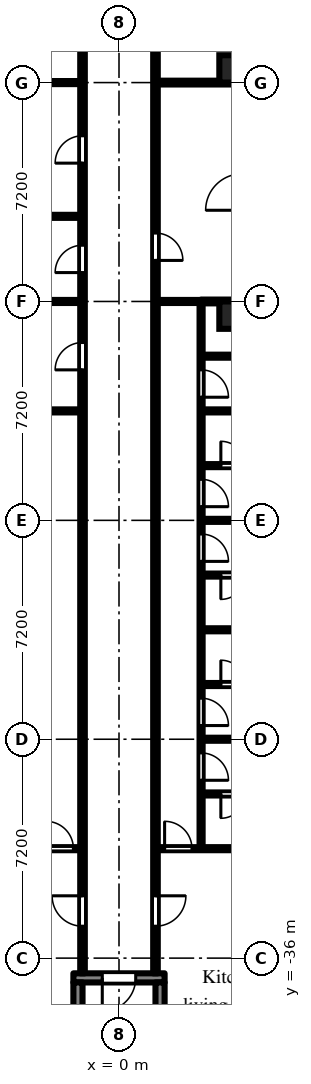
"""IFC4 building model, lengths in metres.
Left out: names, types, materials, properties, quantities, classifications, styles, units other than length and angle.
Written with IfcOpenShell. Run it as: python <this file> out.ifc"""

import sys

from ifc_helpers import new_model, si_unit, direction, frame, frame_2d, origin, origin_2d, place, context, subcontext, project, spatial, rectangle, extrude, element, fill, save


model = new_model("IFC4")
c1 = context("Model", 3, precision=1e-05, world=origin(), true_north=direction((0.0, 1.0)))
c2 = subcontext(c1, "Body", "Model", "MODEL_VIEW")
j1 = project(units=[si_unit("LENGTHUNIT", "METRE"), si_unit("PLANEANGLEUNIT", "RADIAN")], contexts=[c1])
p1 = place(None, origin())
s1 = spatial("IfcSite", under=j1, at=p1, CompositionType="ELEMENT")
p2 = place(p1, origin())
s2 = spatial("IfcBuilding", under=s1, at=p2, CompositionType="ELEMENT")
p3 = place(p2, frame((0.0, 0.0, 20.7)))
s3 = spatial("IfcBuildingStorey", under=s2, at=p3, CompositionType="ELEMENT", Elevation=20.7)
for number, where, z_axis, x_axis in (
    (1, (3.75, -14.85, 0.0), (0.0, 0.0, 1.0), (1.0, 0.0, 0.0)),
    (2, (3.75, -6.75, 0.0), (0.0, 0.0, 1.0), (1.0, 0.0, 0.0)),
):
    element("IfcColumn", number, at=place(p3, frame(where, z_axis=z_axis, x_axis=x_axis)), inside=s3, PredefinedType="COLUMN", context=c2, shape_type="SweptSolid", body=[
        extrude(rectangle(XDim=0.9, YDim=0.9, at=origin_2d()), origin(), (0.0, 0.0, 1.0), 3.0),
    ])
p4 = place(p3, frame((-1.5, -36.65, 0.0), z_axis=(0.0, 0.0, 1.0), x_axis=(1.0, 0.0, 0.0)))
e3 = element("IfcWall", 3, at=p4, inside=s3, PredefinedType="SHEAR", context=c2, shape_type="SweptSolid", body=[
    extrude(rectangle(XDim=3.0, YDim=0.3, at=frame_2d((1.5, 0.0))), origin(), (0.0, 0.0, 1.0), 2.575),
])
p5 = place(p4, frame((0.95, 0.0, 0.0)))
e4 = element("IfcOpeningElement", 4, at=p5, cuts=e3, PredefinedType="OPENING", context=c2, shape_type="SweptSolid", body=[
    extrude(rectangle(XDim=1.1, YDim=2.1, at=frame_2d((0.55, 1.05))), frame((0.0, 0.16, 0.0), z_axis=(0.0, -1.0, 0.0), x_axis=(1.0, 0.0, 0.0)), (0.0, 0.0, 1.0), 0.32),
])
for number, where, z_axis, x_axis in (
    (5, (-1.35, -36.8, 0.0), (0.0, 0.0, 1.0), (0.0, -1.0, 0.0)),
    (6, (1.35, -36.8, 0.0), (0.0, 0.0, 1.0), (0.0, -1.0, 0.0)),
):
    element("IfcWall", number, at=place(p3, frame(where, z_axis=z_axis, x_axis=x_axis)), inside=s3, PredefinedType="SHEAR", context=c2, shape_type="SweptSolid", body=[
        extrude(rectangle(XDim=5.8, YDim=0.3, at=frame_2d((2.9, 0.0))), origin(), (0.0, 0.0, 1.0), 2.575),
    ])
p6 = place(p3, frame((-6.9, -32.4, 0.0), z_axis=(0.0, 0.0, 1.0), x_axis=(1.0, 0.0, 0.0)))
e7 = element("IfcWall", 7, at=p6, inside=s3, PredefinedType="PARTITIONING", context=c2, shape_type="SweptSolid", body=[
    extrude(rectangle(XDim=5.625, YDim=0.1, at=frame_2d((2.812, 0.0))), origin(), (0.0, 0.0, 1.0), 2.575),
])
p7 = place(p6, frame((4.5, 0.0, 0.0)))
e8 = element("IfcOpeningElement", 8, at=p7, cuts=e7, PredefinedType="OPENING", context=c2, shape_type="SweptSolid", body=[
    extrude(rectangle(XDim=0.9, YDim=2.1, at=frame_2d((0.45, 1.05))), frame((0.0, 0.06, 0.0), z_axis=(0.0, -1.0, 0.0), x_axis=(1.0, 0.0, 0.0)), (0.0, 0.0, 1.0), 0.12),
])
p8 = place(p3, frame((-6.9, -18.0, 0.0), z_axis=(0.0, 0.0, 1.0), x_axis=(1.0, 0.0, 0.0)))
e9 = element("IfcWall", 9, at=p8, inside=s3, PredefinedType="PARTITIONING", context=c2, shape_type="SweptSolid", body=[
    extrude(rectangle(XDim=5.625, YDim=0.1, at=frame_2d((2.812, 0.0))), origin(), (0.0, 0.0, 1.0), 2.575),
])
for number, where, z_axis, x_axis in (
    (10, (-3.9, -14.4, 0.0), (0.0, 0.0, 1.0), (1.0, 0.0, 0.0)),
    (11, (-3.9, -11.6, 0.0), (0.0, 0.0, 1.0), (1.0, 0.0, 0.0)),
    (12, (-3.9, -7.2, 0.0), (0.0, 0.0, 1.0), (1.0, 0.0, 0.0)),
):
    element("IfcWall", number, at=place(p3, frame(where, z_axis=z_axis, x_axis=x_axis)), inside=s3, PredefinedType="PARTITIONING", context=c2, shape_type="SweptSolid", body=[
        extrude(rectangle(XDim=2.625, YDim=0.1, at=frame_2d((1.312, 0.0))), origin(), (0.0, 0.0, 1.0), 2.575),
    ])
p9 = place(p3, frame((-1.2, -36.5, 0.0), z_axis=(0.0, 0.0, 1.0), x_axis=(0.0, 1.0, 0.0)))
e13 = element("IfcWall", 13, at=p9, inside=s3, PredefinedType="PARTITIONING", context=c2, shape_type="SweptSolid", body=[
    extrude(rectangle(XDim=35.225, YDim=0.15, at=frame_2d((17.613, 0.0))), origin(), (0.0, 0.0, 1.0), 2.575),
])
p10 = place(p9, frame((30.35, 0.0, 0.0)))
e14 = element("IfcOpeningElement", 14, at=p10, cuts=e13, PredefinedType="OPENING", context=c2, shape_type="SweptSolid", body=[
    extrude(rectangle(XDim=0.9, YDim=2.1, at=frame_2d((0.45, 1.05))), frame((0.0, 0.085, 0.0), z_axis=(0.0, -1.0, 0.0), x_axis=(1.0, 0.0, 0.0)), (0.0, 0.0, 1.0), 0.17),
])
p11 = place(p9, frame((23.05, 0.0, 0.0)))
e15 = element("IfcOpeningElement", 15, at=p11, cuts=e13, PredefinedType="OPENING", context=c2, shape_type="SweptSolid", body=[
    extrude(rectangle(XDim=0.9, YDim=2.1, at=frame_2d((0.45, 1.05))), frame((0.0, 0.085, 0.0), z_axis=(0.0, -1.0, 0.0), x_axis=(1.0, 0.0, 0.0)), (0.0, 0.0, 1.0), 0.17),
])
p12 = place(p9, frame((26.65, 0.0, 0.0)))
e16 = element("IfcOpeningElement", 16, at=p12, cuts=e13, PredefinedType="OPENING", context=c2, shape_type="SweptSolid", body=[
    extrude(rectangle(XDim=0.9, YDim=2.1, at=frame_2d((0.45, 1.05))), frame((0.0, 0.085, 0.0), z_axis=(0.0, -1.0, 0.0), x_axis=(1.0, 0.0, 0.0)), (0.0, 0.0, 1.0), 0.17),
])
p13 = place(p9, frame((19.85, 0.0, 0.0)))
e17 = element("IfcOpeningElement", 17, at=p13, cuts=e13, PredefinedType="OPENING", context=c2, shape_type="SweptSolid", body=[
    extrude(rectangle(XDim=0.9, YDim=2.1, at=frame_2d((0.45, 1.05))), frame((0.0, 0.085, 0.0), z_axis=(0.0, -1.0, 0.0), x_axis=(1.0, 0.0, 0.0)), (0.0, 0.0, 1.0), 0.17),
])
p14 = place(p9, frame((1.55, 0.0, 0.0)))
e18 = element("IfcOpeningElement", 18, at=p14, cuts=e13, PredefinedType="OPENING", context=c2, shape_type="SweptSolid", body=[
    extrude(rectangle(XDim=1.0, YDim=2.1, at=frame_2d((0.5, 1.05))), frame((0.0, 0.085, 0.0), z_axis=(0.0, -1.0, 0.0), x_axis=(1.0, 0.0, 0.0)), (0.0, 0.0, 1.0), 0.17),
])
p15 = place(p3, frame((1.2, -36.5, 0.0), z_axis=(0.0, 0.0, 1.0), x_axis=(0.0, 1.0, 0.0)))
e19 = element("IfcWall", 19, at=p15, inside=s3, PredefinedType="PARTITIONING", context=c2, shape_type="SweptSolid", body=[
    extrude(rectangle(XDim=35.375, YDim=0.15, at=frame_2d((17.688, 0.0))), origin(), (0.0, 0.0, 1.0), 2.575),
])
p16 = place(p15, frame((31.85, 0.0, 0.0)))
e20 = element("IfcOpeningElement", 20, at=p16, cuts=e19, PredefinedType="OPENING", context=c2, shape_type="SweptSolid", body=[
    extrude(rectangle(XDim=0.9, YDim=2.1, at=frame_2d((0.45, 1.05))), frame((0.0, 0.085, 0.0), z_axis=(0.0, -1.0, 0.0), x_axis=(1.0, 0.0, 0.0)), (0.0, 0.0, 1.0), 0.17),
])
p17 = place(p15, frame((23.45, 0.0, 0.0)))
e21 = element("IfcOpeningElement", 21, at=p17, cuts=e19, PredefinedType="OPENING", context=c2, shape_type="SweptSolid", body=[
    extrude(rectangle(XDim=0.9, YDim=2.1, at=frame_2d((0.45, 1.05))), frame((0.0, 0.085, 0.0), z_axis=(0.0, -1.0, 0.0), x_axis=(1.0, 0.0, 0.0)), (0.0, 0.0, 1.0), 0.17),
])
p18 = place(p15, frame((1.55, 0.0, 0.0)))
e22 = element("IfcOpeningElement", 22, at=p18, cuts=e19, PredefinedType="OPENING", context=c2, shape_type="SweptSolid", body=[
    extrude(rectangle(XDim=1.0, YDim=2.1, at=frame_2d((0.5, 1.05))), frame((0.0, 0.085, 0.0), z_axis=(0.0, -1.0, 0.0), x_axis=(1.0, 0.0, 0.0)), (0.0, 0.0, 1.0), 0.17),
])
p19 = place(p3, frame((1.275, -32.4, 0.0), z_axis=(0.0, 0.0, 1.0), x_axis=(1.0, 0.0, 0.0)))
e23 = element("IfcWall", 23, at=p19, inside=s3, PredefinedType="PARTITIONING", context=c2, shape_type="SweptSolid", body=[
    extrude(rectangle(XDim=5.625, YDim=0.1, at=frame_2d((2.812, 0.0))), origin(), (0.0, 0.0, 1.0), 2.575),
])
p20 = place(p19, frame((0.225, 0.0, 0.0)))
e24 = element("IfcOpeningElement", 24, at=p20, cuts=e23, PredefinedType="OPENING", context=c2, shape_type="SweptSolid", body=[
    extrude(rectangle(XDim=0.9, YDim=2.1, at=frame_2d((0.45, 1.05))), frame((0.0, 0.06, 0.0), z_axis=(0.0, -1.0, 0.0), x_axis=(1.0, 0.0, 0.0)), (0.0, 0.0, 1.0), 0.12),
])
p21 = place(p3, frame((1.275, -14.4, 0.0), z_axis=(0.0, 0.0, 1.0), x_axis=(1.0, 0.0, 0.0)))
e25 = element("IfcWall", 25, at=p21, inside=s3, PredefinedType="PARTITIONING", context=c2, shape_type="SweptSolid", body=[
    extrude(rectangle(XDim=1.425, YDim=0.1, at=frame_2d((0.712, 0.0))), origin(), (0.0, 0.0, 1.0), 2.575),
])
p22 = place(p3, frame((1.275, -7.2, 0.0), z_axis=(0.0, 0.0, 1.0), x_axis=(1.0, 0.0, 0.0)))
e26 = element("IfcWall", 26, at=p22, inside=s3, PredefinedType="PARTITIONING", context=c2, shape_type="SweptSolid", body=[
    extrude(rectangle(XDim=2.625, YDim=0.125, at=frame_2d((1.312, 0.0))), origin(), (0.0, 0.0, 1.0), 2.575),
])
p23 = place(p3, frame((2.7, -32.35, 0.0), z_axis=(0.0, 0.0, 1.0), x_axis=(0.0, 1.0, 0.0)))
e27 = element("IfcWall", 27, at=p23, inside=s3, PredefinedType="PARTITIONING", context=c2, shape_type="SweptSolid", body=[
    extrude(rectangle(XDim=17.888, YDim=0.1, at=frame_2d((8.944, 0.0))), origin(), (0.0, 0.0, 1.0), 2.575),
])
p24 = place(p23, frame((2.2, 0.0, 0.0)))
e28 = element("IfcOpeningElement", 28, at=p24, cuts=e27, PredefinedType="OPENING", context=c2, shape_type="SweptSolid", body=[
    extrude(rectangle(XDim=0.9, YDim=2.1, at=frame_2d((0.45, 1.05))), frame((0.0, 0.06, 0.0), z_axis=(0.0, -1.0, 0.0), x_axis=(1.0, 0.0, 0.0)), (0.0, 0.0, 1.0), 0.12),
])
p25 = place(p23, frame((4.0, 0.0, 0.0)))
e29 = element("IfcOpeningElement", 29, at=p25, cuts=e27, PredefinedType="OPENING", context=c2, shape_type="SweptSolid", body=[
    extrude(rectangle(XDim=0.9, YDim=2.1, at=frame_2d((0.45, 1.05))), frame((0.0, 0.06, 0.0), z_axis=(0.0, -1.0, 0.0), x_axis=(1.0, 0.0, 0.0)), (0.0, 0.0, 1.0), 0.12),
])
p26 = place(p23, frame((9.4, 0.0, 0.0)))
e30 = element("IfcOpeningElement", 30, at=p26, cuts=e27, PredefinedType="OPENING", context=c2, shape_type="SweptSolid", body=[
    extrude(rectangle(XDim=0.9, YDim=2.1, at=frame_2d((0.45, 1.05))), frame((0.0, 0.06, 0.0), z_axis=(0.0, -1.0, 0.0), x_axis=(1.0, 0.0, 0.0)), (0.0, 0.0, 1.0), 0.12),
])
p27 = place(p23, frame((11.2, 0.0, 0.0)))
e31 = element("IfcOpeningElement", 31, at=p27, cuts=e27, PredefinedType="OPENING", context=c2, shape_type="SweptSolid", body=[
    extrude(rectangle(XDim=0.9, YDim=2.1, at=frame_2d((0.45, 1.05))), frame((0.0, 0.06, 0.0), z_axis=(0.0, -1.0, 0.0), x_axis=(1.0, 0.0, 0.0)), (0.0, 0.0, 1.0), 0.12),
])
p28 = place(p23, frame((14.8, 0.0, 0.0)))
e32 = element("IfcOpeningElement", 32, at=p28, cuts=e27, PredefinedType="OPENING", context=c2, shape_type="SweptSolid", body=[
    extrude(rectangle(XDim=0.9, YDim=2.1, at=frame_2d((0.45, 1.05))), frame((0.0, 0.06, 0.0), z_axis=(0.0, -1.0, 0.0), x_axis=(1.0, 0.0, 0.0)), (0.0, 0.0, 1.0), 0.12),
])
p29 = place(p3, frame((2.75, -30.6, 0.0), z_axis=(0.0, 0.0, 1.0), x_axis=(1.0, 0.0, 0.0)))
e33 = element("IfcWall", 33, at=p29, inside=s3, PredefinedType="PARTITIONING", context=c2, shape_type="SweptSolid", body=[
    extrude(rectangle(XDim=2.1, YDim=0.1, at=frame_2d((1.05, 0.0))), origin(), (0.0, 0.0, 1.0), 2.575),
])
p30 = place(p29, frame((0.6, 0.0, 0.0)))
e34 = element("IfcOpeningElement", 34, at=p30, cuts=e33, PredefinedType="OPENING", context=c2, shape_type="SweptSolid", body=[
    extrude(rectangle(XDim=0.8, YDim=2.1, at=frame_2d((0.4, 1.05))), frame((0.0, 0.06, 0.0), z_axis=(0.0, -1.0, 0.0), x_axis=(1.0, 0.0, 0.0)), (0.0, 0.0, 1.0), 0.12),
])
p31 = place(p3, frame((2.75, -28.8, 0.0), z_axis=(0.0, 0.0, 1.0), x_axis=(1.0, 0.0, 0.0)))
e35 = element("IfcWall", 35, at=p31, inside=s3, PredefinedType="PARTITIONING", context=c2, shape_type="SweptSolid", body=[
    extrude(rectangle(XDim=4.15, YDim=0.1, at=frame_2d((2.075, 0.0))), origin(), (0.0, 0.0, 1.0), 2.575),
])
p32 = place(p3, frame((2.75, -27.0, 0.0), z_axis=(0.0, 0.0, 1.0), x_axis=(1.0, 0.0, 0.0)))
e36 = element("IfcWall", 36, at=p32, inside=s3, PredefinedType="PARTITIONING", context=c2, shape_type="SweptSolid", body=[
    extrude(rectangle(XDim=2.1, YDim=0.1, at=frame_2d((1.05, 0.0))), origin(), (0.0, 0.0, 1.0), 2.575),
])
p33 = place(p32, frame((0.6, 0.0, 0.0)))
e37 = element("IfcOpeningElement", 37, at=p33, cuts=e36, PredefinedType="OPENING", context=c2, shape_type="SweptSolid", body=[
    extrude(rectangle(XDim=0.8, YDim=2.1, at=frame_2d((0.4, 1.05))), frame((0.0, 0.06, 0.0), z_axis=(0.0, -1.0, 0.0), x_axis=(1.0, 0.0, 0.0)), (0.0, 0.0, 1.0), 0.12),
])
p34 = place(p3, frame((2.75, -25.2, 0.0), z_axis=(0.0, 0.0, 1.0), x_axis=(1.0, 0.0, 0.0)))
e38 = element("IfcWall", 38, at=p34, inside=s3, PredefinedType="PARTITIONING", context=c2, shape_type="SweptSolid", body=[
    extrude(rectangle(XDim=4.15, YDim=0.1, at=frame_2d((2.075, 0.0))), origin(), (0.0, 0.0, 1.0), 2.575),
])
p35 = place(p3, frame((2.75, -23.4, 0.0), z_axis=(0.0, 0.0, 1.0), x_axis=(1.0, 0.0, 0.0)))
e39 = element("IfcWall", 39, at=p35, inside=s3, PredefinedType="PARTITIONING", context=c2, shape_type="SweptSolid", body=[
    extrude(rectangle(XDim=2.1, YDim=0.1, at=frame_2d((1.05, 0.0))), origin(), (0.0, 0.0, 1.0), 2.575),
])
p36 = place(p35, frame((0.6, 0.0, 0.0)))
e40 = element("IfcOpeningElement", 40, at=p36, cuts=e39, PredefinedType="OPENING", context=c2, shape_type="SweptSolid", body=[
    extrude(rectangle(XDim=0.8, YDim=2.1, at=frame_2d((0.4, 1.05))), frame((0.0, 0.06, 0.0), z_axis=(0.0, -1.0, 0.0), x_axis=(1.0, 0.0, 0.0)), (0.0, 0.0, 1.0), 0.12),
])
p37 = place(p3, frame((2.75, -21.6, 0.0), z_axis=(0.0, 0.0, 1.0), x_axis=(1.0, 0.0, 0.0)))
e41 = element("IfcWall", 41, at=p37, inside=s3, PredefinedType="PARTITIONING", context=c2, shape_type="SweptSolid", body=[
    extrude(rectangle(XDim=4.15, YDim=0.1, at=frame_2d((2.075, 0.0))), origin(), (0.0, 0.0, 1.0), 2.575),
])
p38 = place(p3, frame((2.75, -19.8, 0.0), z_axis=(0.0, 0.0, 1.0), x_axis=(1.0, 0.0, 0.0)))
e42 = element("IfcWall", 42, at=p38, inside=s3, PredefinedType="PARTITIONING", context=c2, shape_type="SweptSolid", body=[
    extrude(rectangle(XDim=2.1, YDim=0.1, at=frame_2d((1.05, 0.0))), origin(), (0.0, 0.0, 1.0), 2.575),
])
p39 = place(p38, frame((0.6, 0.0, 0.0)))
e43 = element("IfcOpeningElement", 43, at=p39, cuts=e42, PredefinedType="OPENING", context=c2, shape_type="SweptSolid", body=[
    extrude(rectangle(XDim=0.8, YDim=2.1, at=frame_2d((0.4, 1.05))), frame((0.0, 0.06, 0.0), z_axis=(0.0, -1.0, 0.0), x_axis=(1.0, 0.0, 0.0)), (0.0, 0.0, 1.0), 0.12),
])
p40 = place(p3, frame((2.75, -18.0, 0.0), z_axis=(0.0, 0.0, 1.0), x_axis=(1.0, 0.0, 0.0)))
e44 = element("IfcWall", 44, at=p40, inside=s3, PredefinedType="PARTITIONING", context=c2, shape_type="SweptSolid", body=[
    extrude(rectangle(XDim=4.15, YDim=0.1, at=frame_2d((2.075, 0.0))), origin(), (0.0, 0.0, 1.0), 2.575),
])
p41 = place(p3, frame((2.75, -16.2, 0.0), z_axis=(0.0, 0.0, 1.0), x_axis=(1.0, 0.0, 0.0)))
e45 = element("IfcWall", 45, at=p41, inside=s3, PredefinedType="PARTITIONING", context=c2, shape_type="SweptSolid", body=[
    extrude(rectangle(XDim=2.1, YDim=0.1, at=frame_2d((1.05, 0.0))), origin(), (0.0, 0.0, 1.0), 2.575),
])
p42 = place(p3, frame((2.7, -14.4, 0.0), z_axis=(0.0, 0.0, 1.0), x_axis=(1.0, 0.0, 0.0)))
e46 = element("IfcWall", 46, at=p42, inside=s3, PredefinedType="PARTITIONING", context=c2, shape_type="SweptSolid", body=[
    extrude(rectangle(XDim=1.2, YDim=0.125, at=frame_2d((0.6, 0.0))), origin(), (0.0, 0.0, 1.0), 2.575),
])
p43 = place(p5, frame((1.1, 0.0, 0.0), z_axis=(0.0, 0.0, 1.0), x_axis=(-1.0, 0.0, 0.0)))
e47 = element("IfcDoor", 47, at=p43, inside=s3, OperationType="SINGLE_SWING_RIGHT", PredefinedType="DOOR", context=c2, shape_type="SweptSolid", body=[
    extrude(rectangle(XDim=1.1, YDim=2.1, at=frame_2d((0.55, 1.05))), frame((0.0, 0.025, 0.0), z_axis=(0.0, -1.0, 0.0), x_axis=(1.0, 0.0, 0.0)), (0.0, 0.0, 1.0), 0.05),
])
fill(e4, e47)
p44 = place(p17, frame((0.9, 0.0, 0.0), z_axis=(0.0, 0.0, 1.0), x_axis=(-1.0, 0.0, 0.0)))
e48 = element("IfcDoor", 48, at=p44, inside=s3, OperationType="SINGLE_SWING_RIGHT", PredefinedType="DOOR", context=c2, shape_type="SweptSolid", body=[
    extrude(rectangle(XDim=0.9, YDim=2.1, at=frame_2d((0.45, 1.05))), frame((0.0, 0.025, 0.0), z_axis=(0.0, -1.0, 0.0), x_axis=(1.0, 0.0, 0.0)), (0.0, 0.0, 1.0), 0.05),
])
fill(e21, e48)
p45 = place(p18, frame((1.0, 0.0, 0.0), z_axis=(0.0, 0.0, 1.0), x_axis=(-1.0, 0.0, 0.0)))
e49 = element("IfcDoor", 49, at=p45, inside=s3, OperationType="SINGLE_SWING_LEFT", PredefinedType="DOOR", context=c2, shape_type="SweptSolid", body=[
    extrude(rectangle(XDim=1.0, YDim=2.1, at=frame_2d((0.5, 1.05))), frame((0.0, 0.025, 0.0), z_axis=(0.0, -1.0, 0.0), x_axis=(1.0, 0.0, 0.0)), (0.0, 0.0, 1.0), 0.05),
])
fill(e22, e49)
p46 = place(p20, origin())
e50 = element("IfcDoor", 50, at=p46, inside=s3, OperationType="SINGLE_SWING_LEFT", PredefinedType="DOOR", context=c2, shape_type="SweptSolid", body=[
    extrude(rectangle(XDim=0.9, YDim=2.1, at=frame_2d((0.45, 1.05))), frame((0.0, 0.025, 0.0), z_axis=(0.0, -1.0, 0.0), x_axis=(1.0, 0.0, 0.0)), (0.0, 0.0, 1.0), 0.05),
])
fill(e24, e50)
p47 = place(p24, frame((0.9, 0.0, 0.0), z_axis=(0.0, 0.0, 1.0), x_axis=(-1.0, 0.0, 0.0)))
e51 = element("IfcDoor", 51, at=p47, inside=s3, OperationType="SINGLE_SWING_RIGHT", PredefinedType="DOOR", context=c2, shape_type="SweptSolid", body=[
    extrude(rectangle(XDim=0.9, YDim=2.1, at=frame_2d((0.45, 1.05))), frame((0.0, 0.025, 0.0), z_axis=(0.0, -1.0, 0.0), x_axis=(1.0, 0.0, 0.0)), (0.0, 0.0, 1.0), 0.05),
])
fill(e28, e51)
p48 = place(p25, frame((0.9, 0.0, 0.0), z_axis=(0.0, 0.0, 1.0), x_axis=(-1.0, 0.0, 0.0)))
e52 = element("IfcDoor", 52, at=p48, inside=s3, OperationType="SINGLE_SWING_RIGHT", PredefinedType="DOOR", context=c2, shape_type="SweptSolid", body=[
    extrude(rectangle(XDim=0.9, YDim=2.1, at=frame_2d((0.45, 1.05))), frame((0.0, 0.025, 0.0), z_axis=(0.0, -1.0, 0.0), x_axis=(1.0, 0.0, 0.0)), (0.0, 0.0, 1.0), 0.05),
])
fill(e29, e52)
p49 = place(p26, frame((0.9, 0.0, 0.0), z_axis=(0.0, 0.0, 1.0), x_axis=(-1.0, 0.0, 0.0)))
e53 = element("IfcDoor", 53, at=p49, inside=s3, OperationType="SINGLE_SWING_RIGHT", PredefinedType="DOOR", context=c2, shape_type="SweptSolid", body=[
    extrude(rectangle(XDim=0.9, YDim=2.1, at=frame_2d((0.45, 1.05))), frame((0.0, 0.025, 0.0), z_axis=(0.0, -1.0, 0.0), x_axis=(1.0, 0.0, 0.0)), (0.0, 0.0, 1.0), 0.05),
])
fill(e30, e53)
p50 = place(p27, frame((0.9, 0.0, 0.0), z_axis=(0.0, 0.0, 1.0), x_axis=(-1.0, 0.0, 0.0)))
e54 = element("IfcDoor", 54, at=p50, inside=s3, OperationType="SINGLE_SWING_RIGHT", PredefinedType="DOOR", context=c2, shape_type="SweptSolid", body=[
    extrude(rectangle(XDim=0.9, YDim=2.1, at=frame_2d((0.45, 1.05))), frame((0.0, 0.025, 0.0), z_axis=(0.0, -1.0, 0.0), x_axis=(1.0, 0.0, 0.0)), (0.0, 0.0, 1.0), 0.05),
])
fill(e31, e54)
p51 = place(p28, frame((0.9, 0.0, 0.0), z_axis=(0.0, 0.0, 1.0), x_axis=(-1.0, 0.0, 0.0)))
e55 = element("IfcDoor", 55, at=p51, inside=s3, OperationType="SINGLE_SWING_RIGHT", PredefinedType="DOOR", context=c2, shape_type="SweptSolid", body=[
    extrude(rectangle(XDim=0.9, YDim=2.1, at=frame_2d((0.45, 1.05))), frame((0.0, 0.025, 0.0), z_axis=(0.0, -1.0, 0.0), x_axis=(1.0, 0.0, 0.0)), (0.0, 0.0, 1.0), 0.05),
])
fill(e32, e55)
p52 = place(p39, origin())
e56 = element("IfcDoor", 56, at=p52, inside=s3, OperationType="SINGLE_SWING_LEFT", PredefinedType="DOOR", context=c2, shape_type="SweptSolid", body=[
    extrude(rectangle(XDim=0.8, YDim=2.1, at=frame_2d((0.4, 1.05))), frame((0.0, 0.025, 0.0), z_axis=(0.0, -1.0, 0.0), x_axis=(1.0, 0.0, 0.0)), (0.0, 0.0, 1.0), 0.05),
])
fill(e43, e56)
p53 = place(p36, frame((0.8, 0.0, 0.0), z_axis=(0.0, 0.0, 1.0), x_axis=(-1.0, 0.0, 0.0)))
e57 = element("IfcDoor", 57, at=p53, inside=s3, OperationType="SINGLE_SWING_RIGHT", PredefinedType="DOOR", context=c2, shape_type="SweptSolid", body=[
    extrude(rectangle(XDim=0.8, YDim=2.1, at=frame_2d((0.4, 1.05))), frame((0.0, 0.025, 0.0), z_axis=(0.0, -1.0, 0.0), x_axis=(1.0, 0.0, 0.0)), (0.0, 0.0, 1.0), 0.05),
])
fill(e40, e57)
p54 = place(p33, origin())
e58 = element("IfcDoor", 58, at=p54, inside=s3, OperationType="SINGLE_SWING_LEFT", PredefinedType="DOOR", context=c2, shape_type="SweptSolid", body=[
    extrude(rectangle(XDim=0.8, YDim=2.1, at=frame_2d((0.4, 1.05))), frame((0.0, 0.025, 0.0), z_axis=(0.0, -1.0, 0.0), x_axis=(1.0, 0.0, 0.0)), (0.0, 0.0, 1.0), 0.05),
])
fill(e37, e58)
p55 = place(p30, frame((0.8, 0.0, 0.0), z_axis=(0.0, 0.0, 1.0), x_axis=(-1.0, 0.0, 0.0)))
e59 = element("IfcDoor", 59, at=p55, inside=s3, OperationType="SINGLE_SWING_RIGHT", PredefinedType="DOOR", context=c2, shape_type="SweptSolid", body=[
    extrude(rectangle(XDim=0.8, YDim=2.1, at=frame_2d((0.4, 1.05))), frame((0.0, 0.025, 0.0), z_axis=(0.0, -1.0, 0.0), x_axis=(1.0, 0.0, 0.0)), (0.0, 0.0, 1.0), 0.05),
])
fill(e34, e59)
p56 = place(p11, origin())
e60 = element("IfcDoor", 60, at=p56, inside=s3, OperationType="SINGLE_SWING_LEFT", PredefinedType="DOOR", context=c2, shape_type="SweptSolid", body=[
    extrude(rectangle(XDim=0.9, YDim=2.1, at=frame_2d((0.45, 1.05))), frame((0.0, 0.025, 0.0), z_axis=(0.0, -1.0, 0.0), x_axis=(1.0, 0.0, 0.0)), (0.0, 0.0, 1.0), 0.05),
])
fill(e15, e60)
p57 = place(p12, origin())
e61 = element("IfcDoor", 61, at=p57, inside=s3, OperationType="SINGLE_SWING_LEFT", PredefinedType="DOOR", context=c2, shape_type="SweptSolid", body=[
    extrude(rectangle(XDim=0.9, YDim=2.1, at=frame_2d((0.45, 1.05))), frame((0.0, 0.025, 0.0), z_axis=(0.0, -1.0, 0.0), x_axis=(1.0, 0.0, 0.0)), (0.0, 0.0, 1.0), 0.05),
])
fill(e16, e61)
p58 = place(p13, origin())
e62 = element("IfcDoor", 62, at=p58, inside=s3, OperationType="SINGLE_SWING_LEFT", PredefinedType="DOOR", context=c2, shape_type="SweptSolid", body=[
    extrude(rectangle(XDim=0.9, YDim=2.1, at=frame_2d((0.45, 1.05))), frame((0.0, 0.025, 0.0), z_axis=(0.0, -1.0, 0.0), x_axis=(1.0, 0.0, 0.0)), (0.0, 0.0, 1.0), 0.05),
])
fill(e17, e62)
p59 = place(p14, origin())
e63 = element("IfcDoor", 63, at=p59, inside=s3, OperationType="SINGLE_SWING_RIGHT", PredefinedType="DOOR", context=c2, shape_type="SweptSolid", body=[
    extrude(rectangle(XDim=1.0, YDim=2.1, at=frame_2d((0.5, 1.05))), frame((0.0, 0.025, 0.0), z_axis=(0.0, -1.0, 0.0), x_axis=(1.0, 0.0, 0.0)), (0.0, 0.0, 1.0), 0.05),
])
fill(e18, e63)
p60 = place(p7, origin())
e64 = element("IfcDoor", 64, at=p60, inside=s3, OperationType="SINGLE_SWING_LEFT", PredefinedType="DOOR", context=c2, shape_type="SweptSolid", body=[
    extrude(rectangle(XDim=0.9, YDim=2.1, at=frame_2d((0.45, 1.05))), frame((0.0, 0.025, 0.0), z_axis=(0.0, -1.0, 0.0), x_axis=(1.0, 0.0, 0.0)), (0.0, 0.0, 1.0), 0.05),
])
fill(e8, e64)
save(model, sys.argv[1])
